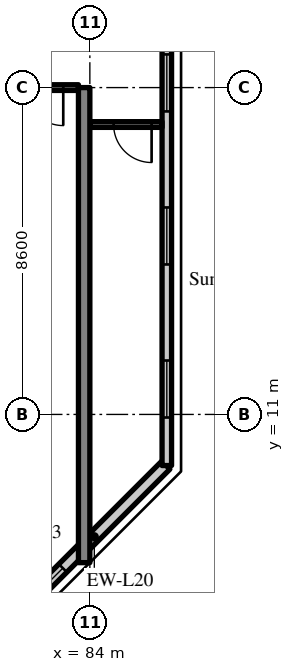
"""IFC4 building model, lengths in metres.
Left out: names, types, materials, properties, quantities, classifications, styles, units other than length and angle.
Written with IfcOpenShell. Run it as: python <this file> out.ifc"""

import sys

from ifc_helpers import new_model, si_unit, direction, frame, frame_2d, origin, place, context, subcontext, project, spatial, rectangle, extrude, source, transform, mapped, element, fill, save


model = new_model("IFC4")
c1 = context("Model", 3, precision=1e-05, world=origin(), true_north=direction((0.0, 1.0)))
c2 = subcontext(c1, "Body", "Model", "MODEL_VIEW")
j1 = project(units=[si_unit("LENGTHUNIT", "METRE"), si_unit("PLANEANGLEUNIT", "RADIAN")], contexts=[c1])
p1 = place(None, origin())
s1 = spatial("IfcSite", under=j1, at=p1, CompositionType="ELEMENT")
p2 = place(p1, origin())
s2 = spatial("IfcBuilding", under=s1, at=p2, CompositionType="ELEMENT")
p3 = place(p2, frame((0.0, 0.0, 221.8)))
s3 = spatial("IfcBuildingStorey", under=s2, at=p3, CompositionType="ELEMENT", Elevation=221.8)
m1 = source(origin(), c2, "Body", "SweptSolid", [
    extrude(rectangle(XDim=12.5, YDim=0.3, at=frame_2d((6.25, 0.0))), origin(), (0.0, 0.0, 1.0), 3.62),
])
p4 = place(p3, frame((83.85, 7.1, 0.0), z_axis=(0.0, 0.0, 1.0), x_axis=(0.0, 1.0, 0.0)))
e1 = element("IfcWall", 1, at=p4, inside=s3, PredefinedType="SHEAR", context=c2, shape_type="MappedRepresentation", body=[
    mapped(m1, transform((0.0, 0.0, 0.0), scale=1.0)),
])
m2 = source(origin(), c2, "Body", "SweptSolid", [
    extrude(rectangle(XDim=5.326, YDim=0.3, at=frame_2d((2.663, 0.0))), origin(), (0.0, 0.0, 1.0), 3.62),
])
p5 = place(p3, frame((82.234, 5.9, 0.0), z_axis=(0.0, 0.0, 1.0), x_axis=(0.707083859269, 0.707129702361, 0.0)))
e2 = element("IfcWall", 2, at=p5, inside=s3, PredefinedType="SOLIDWALL", context=c2, shape_type="MappedRepresentation", body=[
    mapped(m2, transform((0.0, 0.0, 0.0), scale=1.0)),
])
m3 = source(origin(), c2, "Body", "SweptSolid", [
    extrude(rectangle(XDim=1.2, YDim=1.5, at=frame_2d((0.6, 0.75))), frame((0.0, 0.16, 0.0), z_axis=(0.0, -1.0, 0.0), x_axis=(1.0, 0.0, 0.0)), (0.0, 0.0, 1.0), 0.32),
])
p6 = place(p5, frame((0.292, 0.0, 0.9)))
e3 = element("IfcOpeningElement", 3, at=p6, cuts=e2, PredefinedType="OPENING", context=c2, shape_type="MappedRepresentation", body=[
    mapped(m3, transform((0.0, 0.0, 0.0), scale=1.0)),
])
m4 = source(origin(), c2, "Body", "SweptSolid", [
    extrude(rectangle(XDim=28.189, YDim=0.25, at=frame_2d((14.095, 0.0))), origin(), (0.0, 0.0, 1.0), 3.62),
])
p7 = place(p3, frame((86.025, 9.655, 0.0), z_axis=(0.0, 0.0, 1.0), x_axis=(0.0, 1.0, 0.0)))
e4 = element("IfcWall", 4, at=p7, inside=s3, PredefinedType="SOLIDWALL", context=c2, shape_type="MappedRepresentation", body=[
    mapped(m4, transform((0.0, 0.0, 0.0), scale=1.0)),
])
m5 = source(origin(), c2, "Body", "SweptSolid", [
    extrude(rectangle(XDim=1.5, YDim=1.5, at=frame_2d((0.75, 0.75))), frame((0.0, 0.135, 0.0), z_axis=(0.0, -1.0, 0.0), x_axis=(1.0, 0.0, 0.0)), (0.0, 0.0, 1.0), 0.27),
])
p8 = place(p7, frame((1.263, 0.0, 0.9)))
e5 = element("IfcOpeningElement", 5, at=p8, cuts=e4, PredefinedType="OPENING", context=c2, shape_type="MappedRepresentation", body=[
    mapped(m5, transform((0.0, 0.0, 0.0), scale=1.0)),
])
p9 = place(p7, frame((5.291, 0.0, 0.9)))
e6 = element("IfcOpeningElement", 6, at=p9, cuts=e4, PredefinedType="OPENING", context=c2, shape_type="MappedRepresentation", body=[
    mapped(m5, transform((0.0, 0.0, 0.0), scale=1.0)),
])
p10 = place(p7, frame((9.318, 0.0, 0.9)))
e7 = element("IfcOpeningElement", 7, at=p10, cuts=e4, PredefinedType="OPENING", context=c2, shape_type="MappedRepresentation", body=[
    mapped(m5, transform((0.0, 0.0, 0.0), scale=1.0)),
])
p11 = place(p7, frame((13.345, 0.0, 0.9)))
e8 = element("IfcOpeningElement", 8, at=p11, cuts=e4, PredefinedType="OPENING", context=c2, shape_type="MappedRepresentation", body=[
    mapped(m5, transform((0.0, 0.0, 0.0), scale=1.0)),
])
p12 = place(p7, frame((17.372, 0.0, 0.9)))
e9 = element("IfcOpeningElement", 9, at=p12, cuts=e4, PredefinedType="OPENING", context=c2, shape_type="MappedRepresentation", body=[
    mapped(m5, transform((0.0, 0.0, 0.0), scale=1.0)),
])
p13 = place(p7, frame((21.399, 0.0, 0.9)))
e10 = element("IfcOpeningElement", 10, at=p13, cuts=e4, PredefinedType="OPENING", context=c2, shape_type="MappedRepresentation", body=[
    mapped(m5, transform((0.0, 0.0, 0.0), scale=1.0)),
])
p14 = place(p7, frame((25.426, 0.0, 0.9)))
e11 = element("IfcOpeningElement", 11, at=p14, cuts=e4, PredefinedType="OPENING", context=c2, shape_type="MappedRepresentation", body=[
    mapped(m5, transform((0.0, 0.0, 0.0), scale=1.0)),
])
m6 = source(origin(), c2, "Body", "SweptSolid", [
    extrude(rectangle(XDim=7.95, YDim=0.15, at=frame_2d((3.975, 0.0))), origin(), (0.0, 0.0, 1.0), 2.92),
])
p15 = place(p3, frame((75.75, 19.6, 0.0), z_axis=(0.0, 0.0, 1.0), x_axis=(1.0, 0.0, 0.0)))
e12 = element("IfcWall", 12, at=p15, inside=s3, PredefinedType="PARTITIONING", context=c2, shape_type="MappedRepresentation", body=[
    mapped(m6, transform((0.0, 0.0, 0.0), scale=1.0)),
])
m7 = source(origin(), c2, "Body", "SweptSolid", [
    extrude(rectangle(XDim=1.0, YDim=2.1, at=frame_2d((0.5, 1.05))), frame((0.0, 0.085, 0.0), z_axis=(0.0, -1.0, 0.0), x_axis=(1.0, 0.0, 0.0)), (0.0, 0.0, 1.0), 0.17),
])
p16 = place(p15, frame((6.55, 0.0, 0.0)))
e13 = element("IfcOpeningElement", 13, at=p16, cuts=e12, PredefinedType="OPENING", context=c2, shape_type="MappedRepresentation", body=[
    mapped(m7, transform((0.0, 0.0, 0.0), scale=1.0)),
])
m8 = source(origin(), c2, "Body", "SweptSolid", [
    extrude(rectangle(XDim=1.9, YDim=0.15, at=frame_2d((0.95, 0.0))), origin(), (0.0, 0.0, 1.0), 2.92),
])
p17 = place(p3, frame((84.0, 18.628, 0.0), z_axis=(0.0, 0.0, 1.0), x_axis=(1.0, 0.0, 0.0)))
e14 = element("IfcWall", 14, at=p17, inside=s3, PredefinedType="PARTITIONING", context=c2, shape_type="MappedRepresentation", body=[
    mapped(m8, transform((0.0, 0.0, 0.0), scale=1.0)),
])
p18 = place(p17, frame((0.625, 0.0, 0.0)))
e15 = element("IfcOpeningElement", 15, at=p18, cuts=e14, PredefinedType="OPENING", context=c2, shape_type="MappedRepresentation", body=[
    mapped(m7, transform((0.0, 0.0, 0.0), scale=1.0)),
])
m9 = source(origin(), c2, "Body", "SweptSolid", [
    extrude(rectangle(XDim=1.2, YDim=1.5, at=frame_2d((0.6, 0.75))), frame((0.0, 0.03, 0.0), z_axis=(0.0, -1.0, 0.0), x_axis=(1.0, 0.0, 0.0)), (0.0, 0.0, 1.0), 0.06),
])
p19 = place(p6, origin())
e16 = element("IfcWindow", 16, at=p19, inside=s3, PartitioningType="SINGLE_PANEL", PredefinedType="WINDOW", context=c2, shape_type="MappedRepresentation", body=[
    mapped(m9, transform((0.0, 0.0, 0.0), scale=1.0)),
])
fill(e3, e16)
m10 = source(origin(), c2, "Body", "SweptSolid", [
    extrude(rectangle(XDim=1.5, YDim=1.5, at=frame_2d((0.75, 0.75))), frame((0.0, 0.03, 0.0), z_axis=(0.0, -1.0, 0.0), x_axis=(1.0, 0.0, 0.0)), (0.0, 0.0, 1.0), 0.06),
])
p20 = place(p8, origin())
e17 = element("IfcWindow", 17, at=p20, inside=s3, PartitioningType="SINGLE_PANEL", PredefinedType="WINDOW", context=c2, shape_type="MappedRepresentation", body=[
    mapped(m10, transform((0.0, 0.0, 0.0), scale=1.0)),
])
fill(e5, e17)
p21 = place(p9, origin())
e18 = element("IfcWindow", 18, at=p21, inside=s3, PartitioningType="SINGLE_PANEL", PredefinedType="WINDOW", context=c2, shape_type="MappedRepresentation", body=[
    mapped(m10, transform((0.0, 0.0, 0.0), scale=1.0)),
])
fill(e6, e18)
p22 = place(p10, origin())
e19 = element("IfcWindow", 19, at=p22, inside=s3, PartitioningType="SINGLE_PANEL", PredefinedType="WINDOW", context=c2, shape_type="MappedRepresentation", body=[
    mapped(m10, transform((0.0, 0.0, 0.0), scale=1.0)),
])
fill(e7, e19)
m11 = source(origin(), c2, "Body", "SweptSolid", [
    extrude(rectangle(XDim=1.0, YDim=2.1, at=frame_2d((0.5, 1.05))), frame((0.0, 0.025, 0.0), z_axis=(0.0, -1.0, 0.0), x_axis=(1.0, 0.0, 0.0)), (0.0, 0.0, 1.0), 0.05),
])
p23 = place(p16, origin())
e20 = element("IfcDoor", 20, at=p23, inside=s3, OperationType="SINGLE_SWING_RIGHT", PredefinedType="DOOR", context=c2, shape_type="MappedRepresentation", body=[
    mapped(m11, transform((0.0, 0.0, 0.0), scale=1.0)),
])
fill(e13, e20)
p24 = place(p18, origin())
e21 = element("IfcDoor", 21, at=p24, inside=s3, OperationType="SINGLE_SWING_RIGHT", PredefinedType="DOOR", context=c2, shape_type="MappedRepresentation", body=[
    mapped(m11, transform((0.0, 0.0, 0.0), scale=1.0)),
])
fill(e15, e21)
save(model, sys.argv[1])
